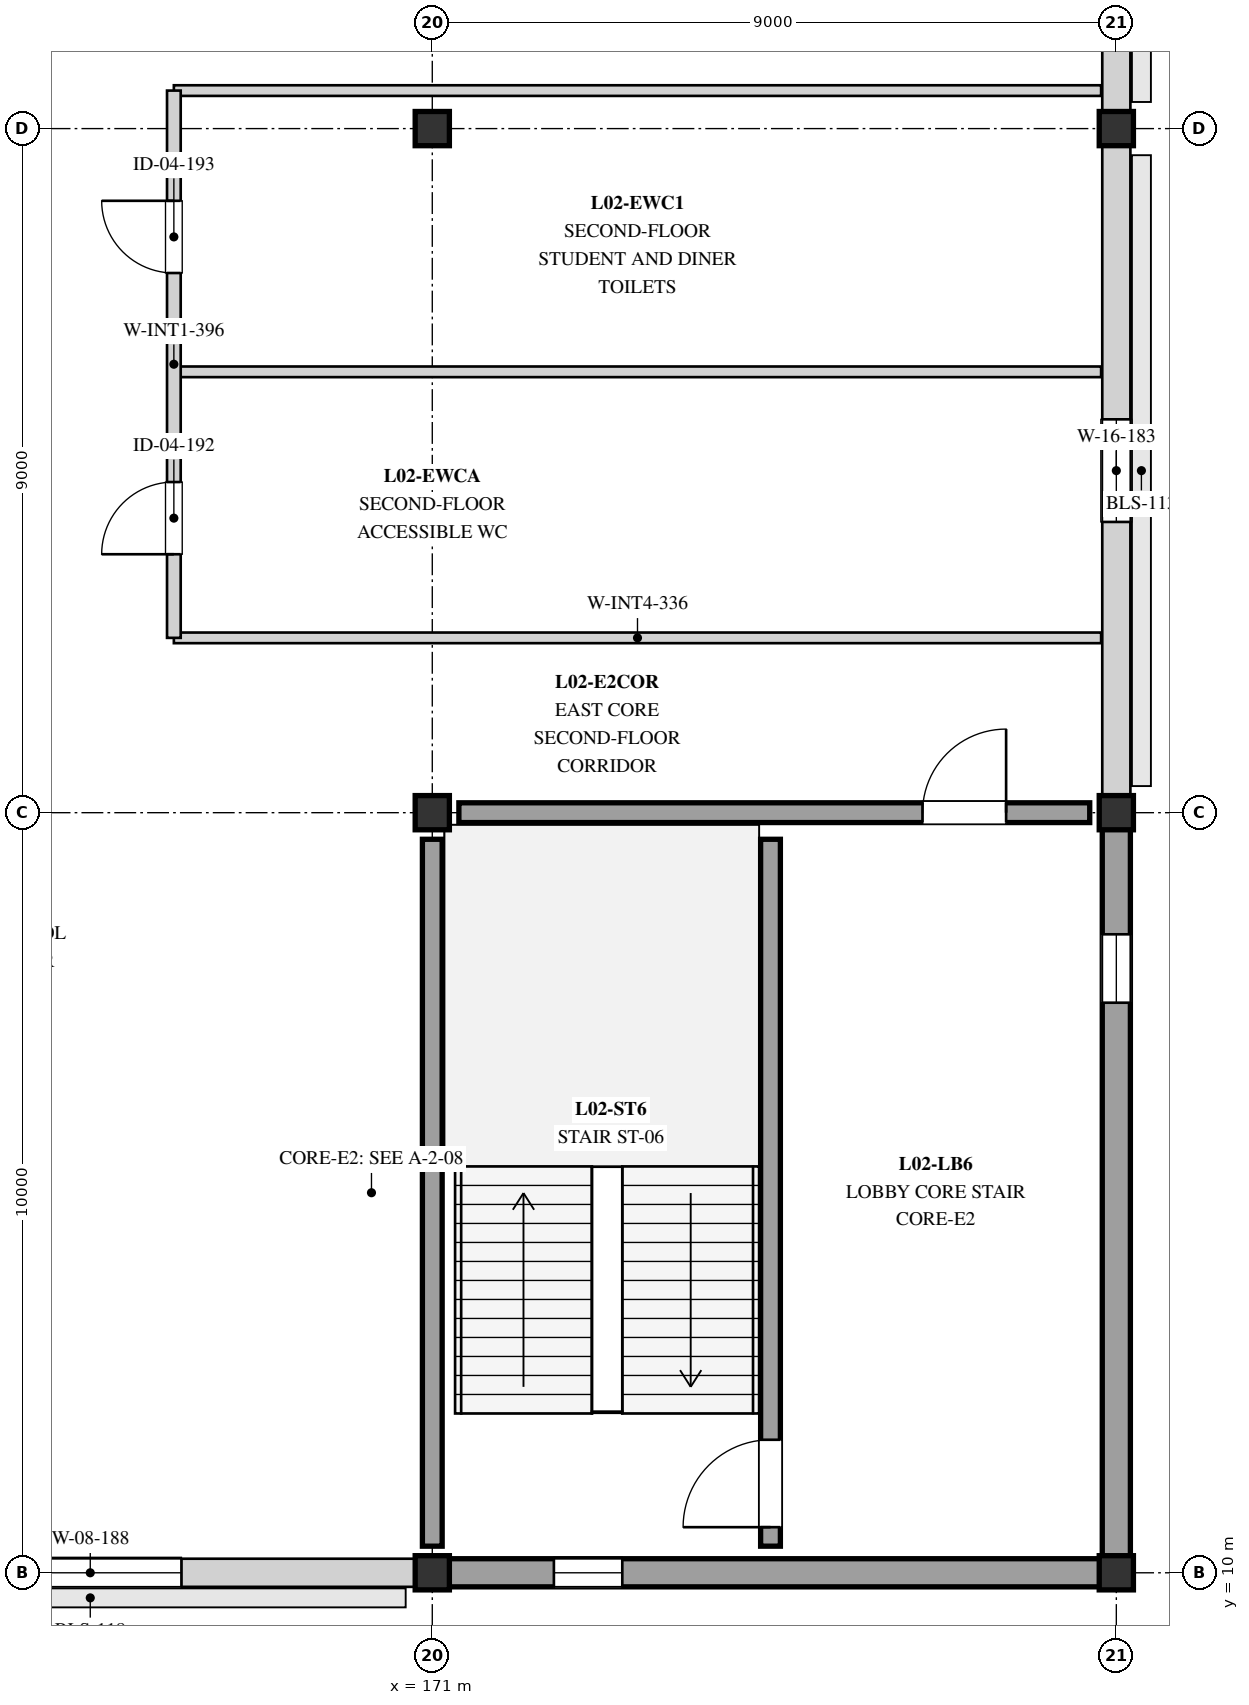
"""IFC4 building model, lengths in metres.
Left out: names, types, materials, properties, quantities, classifications, styles, units other than length and angle.
Written with IfcOpenShell. Run it as: python <this file> out.ifc"""

import sys

from ifc_helpers import new_model, si_unit, direction, frame, frame_2d, origin, origin_2d, place, context, subcontext, project, spatial, rectangle, extrude, element, fill, save


model = new_model("IFC4")
c1 = context("Model", 3, precision=1e-05, world=origin(), true_north=direction((0.0, 1.0)))
c2 = subcontext(c1, "Body", "Model", "MODEL_VIEW")
j1 = project(units=[si_unit("LENGTHUNIT", "METRE"), si_unit("PLANEANGLEUNIT", "RADIAN")], contexts=[c1])
p1 = place(None, origin())
s1 = spatial("IfcSite", under=j1, at=p1, CompositionType="ELEMENT")
p2 = place(p1, origin())
s2 = spatial("IfcBuilding", under=s1, at=p2, CompositionType="ELEMENT")
p3 = place(p2, frame((0.0, 0.0, 8.4)))
s3 = spatial("IfcBuildingStorey", under=s2, at=p3, CompositionType="ELEMENT", Elevation=8.4)
for number, where, z_axis, x_axis in (
    (1, (171.0, 10.0, 0.0), (0.0, 0.0, 1.0), (1.0, 0.0, 0.0)),
    (2, (171.0, 20.0, 0.0), (0.0, 0.0, 1.0), (1.0, 0.0, 0.0)),
    (3, (171.0, 29.0, 0.0), (0.0, 0.0, 1.0), (1.0, 0.0, 0.0)),
    (4, (180.0, 10.0, 0.0), (0.0, 0.0, 1.0), (1.0, 0.0, 0.0)),
    (5, (180.0, 20.0, 0.0), (0.0, 0.0, 1.0), (1.0, 0.0, 0.0)),
    (6, (180.0, 29.0, 0.0), (0.0, 0.0, 1.0), (1.0, 0.0, 0.0)),
):
    element("IfcColumn", number, at=place(p3, frame(where, z_axis=z_axis, x_axis=x_axis)), inside=s3, PredefinedType="COLUMN", context=c2, shape_type="SweptSolid", body=[
        extrude(rectangle(XDim=0.45, YDim=0.45, at=origin_2d()), origin(), (0.0, 0.0, 1.0), 3.6),
    ])
p4 = place(p3, frame((180.0, 20.0, 0.0), z_axis=(0.0, 0.0, 1.0), x_axis=(0.0, -1.0, 0.0)))
e7 = element("IfcWall", 7, at=p4, inside=s3, PredefinedType="STANDARD", context=c2, shape_type="SweptSolid", body=[
    extrude(rectangle(XDim=10.0, YDim=0.37, at=frame_2d((5.0, 0.0))), origin(), (0.0, 0.0, 1.0), 3.35),
])
p5 = place(p4, frame((1.6, 0.0, 0.35)))
e8 = element("IfcOpeningElement", 8, at=p5, cuts=e7, PredefinedType="OPENING", context=c2, shape_type="SweptSolid", body=[
    extrude(rectangle(XDim=0.9, YDim=1.94, at=frame_2d((0.45, 0.97))), frame((0.0, 0.195, 0.0), z_axis=(0.0, -1.0, 0.0), x_axis=(1.0, 0.0, 0.0)), (0.0, 0.0, 1.0), 0.39),
])
p6 = place(p3, frame((180.0, 20.0, 0.0), z_axis=(0.0, 0.0, 1.0), x_axis=(0.0, 1.0, 0.0)))
e9 = element("IfcWall", 9, at=p6, inside=s3, PredefinedType="STANDARD", context=c2, shape_type="SweptSolid", body=[
    extrude(rectangle(XDim=9.0, YDim=0.37, at=frame_2d((4.5, 0.0))), origin(), (0.0, 0.0, 1.0), 2.48),
])
p7 = place(p6, frame((3.825, 0.0, 0.69)))
e10 = element("IfcOpeningElement", 10, at=p7, cuts=e9, PredefinedType="OPENING", context=c2, shape_type="SweptSolid", body=[
    extrude(rectangle(XDim=1.35, YDim=1.6, at=frame_2d((0.675, 0.8))), frame((0.0, 0.195, 0.0), z_axis=(0.0, -1.0, 0.0), x_axis=(1.0, 0.0, 0.0)), (0.0, 0.0, 1.0), 0.39),
])
p8 = place(p3, frame((180.0, 29.0, 0.0), z_axis=(0.0, 0.0, 1.0), x_axis=(0.0, 1.0, 0.0)))
e11 = element("IfcWall", 11, at=p8, inside=s3, PredefinedType="STANDARD", context=c2, shape_type="SweptSolid", body=[
    extrude(rectangle(XDim=9.0, YDim=0.37, at=frame_2d((4.5, 0.0))), origin(), (0.0, 0.0, 1.0), 2.48),
])
p9 = place(p8, frame((2.25, 0.0, 0.35)))
e12 = element("IfcOpeningElement", 12, at=p9, cuts=e11, PredefinedType="OPENING", context=c2, shape_type="SweptSolid", body=[
    extrude(rectangle(XDim=2.4, YDim=1.94, at=frame_2d((1.2, 0.97))), frame((0.0, 0.195, 0.0), z_axis=(0.0, -1.0, 0.0), x_axis=(1.0, 0.0, 0.0)), (0.0, 0.0, 1.0), 0.39),
])
p10 = place(p3, frame((162.0, 10.0, 0.0), z_axis=(0.0, 0.0, 1.0), x_axis=(1.0, 0.0, 0.0)))
e13 = element("IfcWall", 13, at=p10, inside=s3, PredefinedType="STANDARD", context=c2, shape_type="SweptSolid", body=[
    extrude(rectangle(XDim=9.0, YDim=0.37, at=frame_2d((4.5, 0.0))), origin(), (0.0, 0.0, 1.0), 2.48),
])
p11 = place(p10, frame((3.3, 0.0, 0.35)))
e14 = element("IfcOpeningElement", 14, at=p11, cuts=e13, PredefinedType="OPENING", context=c2, shape_type="SweptSolid", body=[
    extrude(rectangle(XDim=2.4, YDim=1.94, at=frame_2d((1.2, 0.97))), frame((0.0, 0.195, 0.0), z_axis=(0.0, -1.0, 0.0), x_axis=(1.0, 0.0, 0.0)), (0.0, 0.0, 1.0), 0.39),
])
p12 = place(p3, frame((171.0, 10.0, 0.0), z_axis=(0.0, 0.0, 1.0), x_axis=(1.0, 0.0, 0.0)))
e15 = element("IfcWall", 15, at=p12, inside=s3, PredefinedType="STANDARD", context=c2, shape_type="SweptSolid", body=[
    extrude(rectangle(XDim=9.0, YDim=0.37, at=frame_2d((4.5, 0.0))), origin(), (0.0, 0.0, 1.0), 3.35),
])
p13 = place(p12, frame((1.6, 0.0, 0.35)))
e16 = element("IfcOpeningElement", 16, at=p13, cuts=e15, PredefinedType="OPENING", context=c2, shape_type="SweptSolid", body=[
    extrude(rectangle(XDim=0.9, YDim=1.94, at=frame_2d((0.45, 0.97))), frame((0.0, 0.195, 0.0), z_axis=(0.0, -1.0, 0.0), x_axis=(1.0, 0.0, 0.0)), (0.0, 0.0, 1.0), 0.39),
])
p14 = place(p3, frame((175.45, 10.35, 0.0), z_axis=(0.0, 0.0, 1.0), x_axis=(0.0, 1.0, 0.0)))
e17 = element("IfcWall", 17, at=p14, inside=s3, PredefinedType="SHEAR", context=c2, shape_type="SweptSolid", body=[
    extrude(rectangle(XDim=9.3, YDim=0.26, at=frame_2d((4.65, 0.0))), origin(), (0.0, 0.0, 1.0), 3.2),
])
p15 = place(p14, frame((0.25, 0.0, 0.0)))
e18 = element("IfcOpeningElement", 18, at=p15, cuts=e17, PredefinedType="OPENING", context=c2, shape_type="SweptSolid", body=[
    extrude(rectangle(XDim=1.15, YDim=2.15, at=frame_2d((0.575, 1.075))), frame((0.0, 0.14, 0.0), z_axis=(0.0, -1.0, 0.0), x_axis=(1.0, 0.0, 0.0)), (0.0, 0.0, 1.0), 0.28),
])
p16 = place(p3, frame((171.0, 10.35, 0.0), z_axis=(0.0, 0.0, 1.0), x_axis=(0.0, 1.0, 0.0)))
e19 = element("IfcWall", 19, at=p16, inside=s3, PredefinedType="SHEAR", context=c2, shape_type="SweptSolid", body=[
    extrude(rectangle(XDim=9.3, YDim=0.26, at=frame_2d((4.65, 0.0))), origin(), (0.0, 0.0, 1.0), 3.2),
])
p17 = place(p3, frame((171.35, 20.0, 0.0), z_axis=(0.0, 0.0, 1.0), x_axis=(1.0, 0.0, 0.0)))
e20 = element("IfcWall", 20, at=p17, inside=s3, PredefinedType="SHEAR", context=c2, shape_type="SweptSolid", body=[
    extrude(rectangle(XDim=8.3, YDim=0.26, at=frame_2d((4.15, 0.0))), origin(), (0.0, 0.0, 1.0), 3.2),
])
p18 = place(p17, frame((6.1, 0.0, 0.0)))
e21 = element("IfcOpeningElement", 21, at=p18, cuts=e20, PredefinedType="OPENING", context=c2, shape_type="SweptSolid", body=[
    extrude(rectangle(XDim=1.1, YDim=2.1, at=frame_2d((0.55, 1.05))), frame((0.0, 0.14, 0.0), z_axis=(0.0, -1.0, 0.0), x_axis=(1.0, 0.0, 0.0)), (0.0, 0.0, 1.0), 0.28),
])
for number, where, z_axis, x_axis in (
    (22, (167.6, 22.3, 0.0), (0.0, 0.0, 1.0), (1.0, 0.0, 0.0)),
    (23, (167.6, 25.8, 0.0), (0.0, 0.0, 1.0), (1.0, 0.0, 0.0)),
    (24, (167.6, 29.5, 0.0), (0.0, 0.0, 1.0), (1.0, 0.0, 0.0)),
):
    element("IfcWall", number, at=place(p3, frame(where, z_axis=z_axis, x_axis=x_axis)), inside=s3, PredefinedType="PARTITIONING", context=c2, shape_type="SweptSolid", body=[
        extrude(rectangle(XDim=12.2, YDim=0.14, at=frame_2d((6.1, 0.0))), origin(), (0.0, 0.0, 1.0), 2.4),
    ])
p19 = place(p3, frame((167.6, 22.3, 0.0), z_axis=(0.0, 0.0, 1.0), x_axis=(0.0, 1.0, 0.0)))
e25 = element("IfcWall", 25, at=p19, inside=s3, PredefinedType="STANDARD", context=c2, shape_type="SweptSolid", body=[
    extrude(rectangle(XDim=7.2, YDim=0.18, at=frame_2d((3.6, 0.0))), origin(), (0.0, 0.0, 1.0), 2.4),
])
p20 = place(p19, frame((1.1, 0.0, 0.0)))
e26 = element("IfcOpeningElement", 26, at=p20, cuts=e25, PredefinedType="OPENING", context=c2, shape_type="SweptSolid", body=[
    extrude(rectangle(XDim=0.95, YDim=2.1, at=frame_2d((0.475, 1.05))), frame((0.0, 0.1, 0.0), z_axis=(0.0, -1.0, 0.0), x_axis=(1.0, 0.0, 0.0)), (0.0, 0.0, 1.0), 0.2),
])
p21 = place(p19, frame((4.8, 0.0, 0.0)))
e27 = element("IfcOpeningElement", 27, at=p21, cuts=e25, PredefinedType="OPENING", context=c2, shape_type="SweptSolid", body=[
    extrude(rectangle(XDim=0.95, YDim=2.1, at=frame_2d((0.475, 1.05))), frame((0.0, 0.1, 0.0), z_axis=(0.0, -1.0, 0.0), x_axis=(1.0, 0.0, 0.0)), (0.0, 0.0, 1.0), 0.2),
])
p22 = place(p5, origin())
e28 = element("IfcWindow", 28, at=p22, inside=s3, PartitioningType="SINGLE_PANEL", PredefinedType="WINDOW", context=c2, shape_type="SweptSolid", body=[
    extrude(rectangle(XDim=0.9, YDim=1.94, at=frame_2d((0.45, 0.97))), frame((0.0, 0.03, 0.0), z_axis=(0.0, -1.0, 0.0), x_axis=(1.0, 0.0, 0.0)), (0.0, 0.0, 1.0), 0.06),
])
fill(e8, e28)
p23 = place(p7, origin())
e29 = element("IfcWindow", 29, at=p23, inside=s3, PartitioningType="SINGLE_PANEL", PredefinedType="WINDOW", context=c2, shape_type="SweptSolid", body=[
    extrude(rectangle(XDim=1.35, YDim=1.6, at=frame_2d((0.675, 0.8))), frame((0.0, 0.03, 0.0), z_axis=(0.0, -1.0, 0.0), x_axis=(1.0, 0.0, 0.0)), (0.0, 0.0, 1.0), 0.06),
])
fill(e10, e29)
p24 = place(p11, origin())
e30 = element("IfcWindow", 30, at=p24, inside=s3, PartitioningType="SINGLE_PANEL", PredefinedType="WINDOW", context=c2, shape_type="SweptSolid", body=[
    extrude(rectangle(XDim=2.4, YDim=1.94, at=frame_2d((1.2, 0.97))), frame((0.0, 0.03, 0.0), z_axis=(0.0, -1.0, 0.0), x_axis=(1.0, 0.0, 0.0)), (0.0, 0.0, 1.0), 0.06),
])
fill(e14, e30)
p25 = place(p13, origin())
e31 = element("IfcWindow", 31, at=p25, inside=s3, PartitioningType="SINGLE_PANEL", PredefinedType="WINDOW", context=c2, shape_type="SweptSolid", body=[
    extrude(rectangle(XDim=0.9, YDim=1.94, at=frame_2d((0.45, 0.97))), frame((0.0, 0.03, 0.0), z_axis=(0.0, -1.0, 0.0), x_axis=(1.0, 0.0, 0.0)), (0.0, 0.0, 1.0), 0.06),
])
fill(e16, e31)
p26 = place(p15, origin())
e32 = element("IfcDoor", 32, at=p26, inside=s3, OperationType="SINGLE_SWING_LEFT", PredefinedType="DOOR", context=c2, shape_type="SweptSolid", body=[
    extrude(rectangle(XDim=1.15, YDim=2.15, at=frame_2d((0.575, 1.075))), frame((0.0, 0.025, 0.0), z_axis=(0.0, -1.0, 0.0), x_axis=(1.0, 0.0, 0.0)), (0.0, 0.0, 1.0), 0.05),
])
fill(e18, e32)
p27 = place(p18, origin())
e33 = element("IfcDoor", 33, at=p27, inside=s3, OperationType="SINGLE_SWING_RIGHT", PredefinedType="DOOR", context=c2, shape_type="SweptSolid", body=[
    extrude(rectangle(XDim=1.1, YDim=2.1, at=frame_2d((0.55, 1.05))), frame((0.0, 0.025, 0.0), z_axis=(0.0, -1.0, 0.0), x_axis=(1.0, 0.0, 0.0)), (0.0, 0.0, 1.0), 0.05),
])
fill(e21, e33)
p28 = place(p20, origin())
e34 = element("IfcDoor", 34, at=p28, inside=s3, OperationType="SINGLE_SWING_LEFT", PredefinedType="DOOR", context=c2, shape_type="SweptSolid", body=[
    extrude(rectangle(XDim=0.95, YDim=2.1, at=frame_2d((0.475, 1.05))), frame((0.0, 0.025, 0.0), z_axis=(0.0, -1.0, 0.0), x_axis=(1.0, 0.0, 0.0)), (0.0, 0.0, 1.0), 0.05),
])
fill(e26, e34)
p29 = place(p21, origin())
e35 = element("IfcDoor", 35, at=p29, inside=s3, OperationType="SINGLE_SWING_RIGHT", PredefinedType="DOOR", context=c2, shape_type="SweptSolid", body=[
    extrude(rectangle(XDim=0.95, YDim=2.1, at=frame_2d((0.475, 1.05))), frame((0.0, 0.025, 0.0), z_axis=(0.0, -1.0, 0.0), x_axis=(1.0, 0.0, 0.0)), (0.0, 0.0, 1.0), 0.05),
])
fill(e27, e35)
save(model, sys.argv[1])
